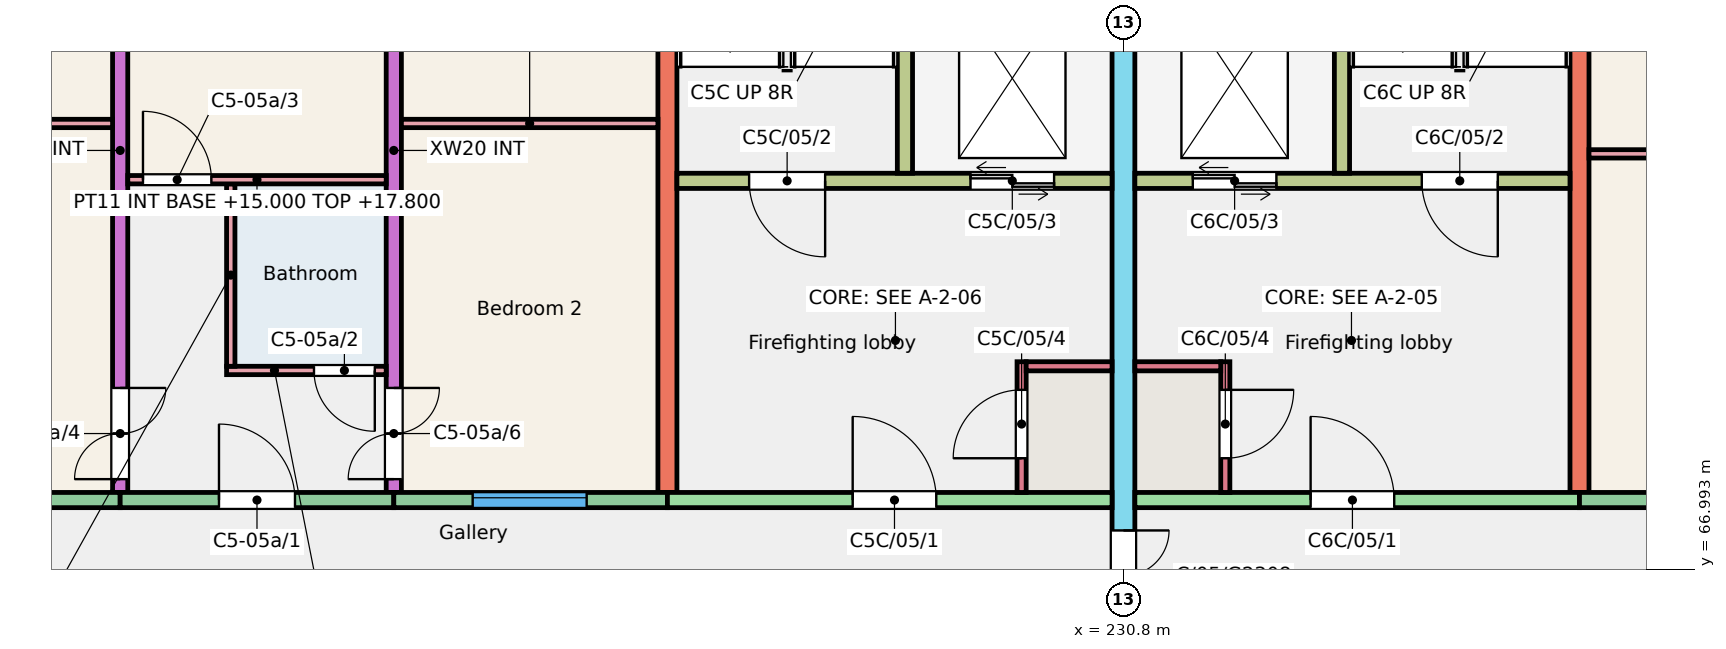
"""IFC4 building model, lengths in metres.
Left out: names, types, materials, properties, quantities, classifications, styles, units other than length and angle.
Written with IfcOpenShell. Run it as: python <this file> out.ifc"""

import sys

from ifc_helpers import new_model, si_unit, direction, frame, frame_2d, origin, place, context, subcontext, project, spatial, rectangle, extrude, element, fill, save


model = new_model("IFC4")
c1 = context("Model", 3, precision=1e-05, world=origin(), true_north=direction((0.0, 1.0)))
c2 = subcontext(c1, "Body", "Model", "MODEL_VIEW")
j1 = project(units=[si_unit("LENGTHUNIT", "METRE"), si_unit("PLANEANGLEUNIT", "RADIAN")], contexts=[c1])
p1 = place(None, origin())
s1 = spatial("IfcSite", under=j1, at=p1, CompositionType="ELEMENT")
p2 = place(p1, origin())
s2 = spatial("IfcBuilding", under=s1, at=p2, CompositionType="ELEMENT")
p3 = place(p2, frame((0.0, 0.0, 15.0)))
s3 = spatial("IfcBuildingStorey", under=s2, at=p3, CompositionType="ELEMENT", Elevation=15.0)
p4 = place(p3, frame((217.6, 68.0, 0.0), z_axis=(0.0, 0.0, 1.0), x_axis=(0.0, 1.0, 0.0)))
e1 = element("IfcWall", 1, at=p4, inside=s3, PredefinedType="SHEAR", context=c2, shape_type="SweptSolid", body=[
    extrude(rectangle(XDim=9.0, YDim=0.2, at=frame_2d((4.5, 0.0))), origin(), (0.0, 0.0, 1.0), 3.0),
])
p5 = place(p4, frame((0.175, 0.0, 0.0)))
e2 = element("IfcOpeningElement", 2, at=p5, cuts=e1, PredefinedType="OPENING", context=c2, shape_type="SweptSolid", body=[
    extrude(rectangle(XDim=1.2, YDim=2.1, at=frame_2d((0.6, 1.05))), frame((0.0, 0.11, 0.0), z_axis=(0.0, -1.0, 0.0), x_axis=(1.0, 0.0, 0.0)), (0.0, 0.0, 1.0), 0.22),
])
p6 = place(p4, frame((6.4, 0.0, 0.0)))
e3 = element("IfcOpeningElement", 3, at=p6, cuts=e1, PredefinedType="OPENING", context=c2, shape_type="SweptSolid", body=[
    extrude(rectangle(XDim=1.2, YDim=2.1, at=frame_2d((0.6, 1.05))), frame((0.0, 0.11, 0.0), z_axis=(0.0, -1.0, 0.0), x_axis=(1.0, 0.0, 0.0)), (0.0, 0.0, 1.0), 0.22),
])
p7 = place(p3, frame((221.2, 68.0, 0.0), z_axis=(0.0, 0.0, 1.0), x_axis=(0.0, 1.0, 0.0)))
e4 = element("IfcWall", 4, at=p7, inside=s3, PredefinedType="SHEAR", context=c2, shape_type="SweptSolid", body=[
    extrude(rectangle(XDim=9.0, YDim=0.2, at=frame_2d((4.5, 0.0))), origin(), (0.0, 0.0, 1.0), 3.0),
])
p8 = place(p7, frame((0.175, 0.0, 0.0)))
e5 = element("IfcOpeningElement", 5, at=p8, cuts=e4, PredefinedType="OPENING", context=c2, shape_type="SweptSolid", body=[
    extrude(rectangle(XDim=1.2, YDim=2.1, at=frame_2d((0.6, 1.05))), frame((0.0, 0.11, 0.0), z_axis=(0.0, -1.0, 0.0), x_axis=(1.0, 0.0, 0.0)), (0.0, 0.0, 1.0), 0.22),
])
p9 = place(p7, frame((6.4, 0.0, 0.0)))
e6 = element("IfcOpeningElement", 6, at=p9, cuts=e4, PredefinedType="OPENING", context=c2, shape_type="SweptSolid", body=[
    extrude(rectangle(XDim=1.2, YDim=2.1, at=frame_2d((0.6, 1.05))), frame((0.0, 0.11, 0.0), z_axis=(0.0, -1.0, 0.0), x_axis=(1.0, 0.0, 0.0)), (0.0, 0.0, 1.0), 0.22),
])
p10 = place(p3, frame((224.8, 68.0, 0.0), z_axis=(0.0, 0.0, 1.0), x_axis=(0.0, 1.0, 0.0)))
e7 = element("IfcWall", 7, at=p10, inside=s3, PredefinedType="SHEAR", context=c2, shape_type="SweptSolid", body=[
    extrude(rectangle(XDim=9.0, YDim=0.25, at=frame_2d((4.5, 0.0))), origin(), (0.0, 0.0, 1.0), 3.0),
])
p11 = place(p3, frame((230.8, 66.0, 0.0), z_axis=(0.0, 0.0, 1.0), x_axis=(0.0, 1.0, 0.0)))
e8 = element("IfcWall", 8, at=p11, inside=s3, PredefinedType="SHEAR", context=c2, shape_type="SweptSolid", body=[
    extrude(rectangle(XDim=11.0, YDim=0.3, at=frame_2d((5.5, 0.0))), origin(), (0.0, 0.0, 1.0), 3.0),
])
p12 = place(p11, frame((0.3, 0.0, 0.0)))
e9 = element("IfcOpeningElement", 9, at=p12, cuts=e8, PredefinedType="OPENING", context=c2, shape_type="SweptSolid", body=[
    extrude(rectangle(XDim=1.2, YDim=2.1, at=frame_2d((0.6, 1.05))), frame((0.0, 0.16, 0.0), z_axis=(0.0, -1.0, 0.0), x_axis=(1.0, 0.0, 0.0)), (0.0, 0.0, 1.0), 0.32),
])
p13 = place(p3, frame((236.8, 68.0, 0.0), z_axis=(0.0, 0.0, 1.0), x_axis=(0.0, 1.0, 0.0)))
e10 = element("IfcWall", 10, at=p13, inside=s3, PredefinedType="SHEAR", context=c2, shape_type="SweptSolid", body=[
    extrude(rectangle(XDim=9.0, YDim=0.25, at=frame_2d((4.5, 0.0))), origin(), (0.0, 0.0, 1.0), 3.0),
])
p14 = place(p3, frame((214.15, 67.9, 0.0), z_axis=(0.0, 0.0, 1.0), x_axis=(1.0, 0.0, 0.0)))
e11 = element("IfcWall", 11, at=p14, inside=s3, PredefinedType="SOLIDWALL", context=c2, shape_type="SweptSolid", body=[
    extrude(rectangle(XDim=3.45, YDim=0.2, at=frame_2d((1.725, 0.0))), origin(), (0.0, 0.0, 1.0), 3.0),
])
p15 = place(p14, frame((0.925, 0.0, 0.9)))
e12 = element("IfcOpeningElement", 12, at=p15, cuts=e11, PredefinedType="OPENING", context=c2, shape_type="SweptSolid", body=[
    extrude(rectangle(XDim=1.5, YDim=1.5, at=frame_2d((0.75, 0.75))), frame((0.0, 0.11, 0.0), z_axis=(0.0, -1.0, 0.0), x_axis=(1.0, 0.0, 0.0)), (0.0, 0.0, 1.0), 0.22),
])
p16 = place(p3, frame((217.6, 67.9, 0.0), z_axis=(0.0, 0.0, 1.0), x_axis=(1.0, 0.0, 0.0)))
e13 = element("IfcWall", 13, at=p16, inside=s3, PredefinedType="SOLIDWALL", context=c2, shape_type="SweptSolid", body=[
    extrude(rectangle(XDim=3.6, YDim=0.2, at=frame_2d((1.8, 0.0))), origin(), (0.0, 0.0, 1.0), 3.0),
])
p17 = place(p16, frame((1.3, 0.0, 0.0)))
e14 = element("IfcOpeningElement", 14, at=p17, cuts=e13, PredefinedType="OPENING", context=c2, shape_type="SweptSolid", body=[
    extrude(rectangle(XDim=1.0, YDim=2.1, at=frame_2d((0.5, 1.05))), frame((0.0, 0.11, 0.0), z_axis=(0.0, -1.0, 0.0), x_axis=(1.0, 0.0, 0.0)), (0.0, 0.0, 1.0), 0.22),
])
p18 = place(p3, frame((221.2, 67.9, 0.0), z_axis=(0.0, 0.0, 1.0), x_axis=(1.0, 0.0, 0.0)))
e15 = element("IfcWall", 15, at=p18, inside=s3, PredefinedType="SOLIDWALL", context=c2, shape_type="SweptSolid", body=[
    extrude(rectangle(XDim=3.6, YDim=0.2, at=frame_2d((1.8, 0.0))), origin(), (0.0, 0.0, 1.0), 3.0),
])
p19 = place(p18, frame((1.038, 0.0, 0.9)))
e16 = element("IfcOpeningElement", 16, at=p19, cuts=e15, PredefinedType="OPENING", context=c2, shape_type="SweptSolid", body=[
    extrude(rectangle(XDim=1.5, YDim=1.5, at=frame_2d((0.75, 0.75))), frame((0.0, 0.11, 0.0), z_axis=(0.0, -1.0, 0.0), x_axis=(1.0, 0.0, 0.0)), (0.0, 0.0, 1.0), 0.22),
])
p20 = place(p3, frame((224.8, 67.9, 0.0), z_axis=(0.0, 0.0, 1.0), x_axis=(1.0, 0.0, 0.0)))
e17 = element("IfcWall", 17, at=p20, inside=s3, PredefinedType="SHEAR", context=c2, shape_type="SweptSolid", body=[
    extrude(rectangle(XDim=5.85, YDim=0.2, at=frame_2d((2.925, 0.0))), origin(), (0.0, 0.0, 1.0), 3.0),
])
p21 = place(p20, frame((2.438, 0.0, 0.0)))
e18 = element("IfcOpeningElement", 18, at=p21, cuts=e17, PredefinedType="OPENING", context=c2, shape_type="SweptSolid", body=[
    extrude(rectangle(XDim=1.1, YDim=2.1, at=frame_2d((0.55, 1.05))), frame((0.0, 0.11, 0.0), z_axis=(0.0, -1.0, 0.0), x_axis=(1.0, 0.0, 0.0)), (0.0, 0.0, 1.0), 0.22),
])
p22 = place(p3, frame((224.925, 72.1, 0.0), z_axis=(0.0, 0.0, 1.0), x_axis=(1.0, 0.0, 0.0)))
e19 = element("IfcWall", 19, at=p22, inside=s3, PredefinedType="SHEAR", context=c2, shape_type="SweptSolid", body=[
    extrude(rectangle(XDim=5.725, YDim=0.2, at=frame_2d((2.862, 0.0))), origin(), (0.0, 0.0, 1.0), 3.0),
])
p23 = place(p22, frame((0.95, 0.0, 0.0)))
e20 = element("IfcOpeningElement", 20, at=p23, cuts=e19, PredefinedType="OPENING", context=c2, shape_type="SweptSolid", body=[
    extrude(rectangle(XDim=1.0, YDim=2.1, at=frame_2d((0.5, 1.05))), frame((0.0, 0.11, 0.0), z_axis=(0.0, -1.0, 0.0), x_axis=(1.0, 0.0, 0.0)), (0.0, 0.0, 1.0), 0.22),
])
p24 = place(p22, frame((3.863, 0.0, 0.0)))
e21 = element("IfcOpeningElement", 21, at=p24, cuts=e19, PredefinedType="OPENING", context=c2, shape_type="SweptSolid", body=[
    extrude(rectangle(XDim=1.1, YDim=2.1, at=frame_2d((0.55, 1.05))), frame((0.0, 0.11, 0.0), z_axis=(0.0, -1.0, 0.0), x_axis=(1.0, 0.0, 0.0)), (0.0, 0.0, 1.0), 0.22),
])
p25 = place(p3, frame((227.925, 72.2, 0.0), z_axis=(0.0, 0.0, 1.0), x_axis=(0.0, 1.0, 0.0)))
e22 = element("IfcWall", 22, at=p25, inside=s3, PredefinedType="SHEAR", context=c2, shape_type="SweptSolid", body=[
    extrude(rectangle(XDim=4.8, YDim=0.2, at=frame_2d((2.4, 0.0))), origin(), (0.0, 0.0, 1.0), 3.0),
])
p26 = place(p3, frame((229.46, 68.0, 0.0), z_axis=(0.0, 0.0, 1.0), x_axis=(0.0, 1.0, 0.0)))
e23 = element("IfcWall", 23, at=p26, inside=s3, PredefinedType="SHEAR", context=c2, shape_type="SweptSolid", body=[
    extrude(rectangle(XDim=1.72, YDim=0.12, at=frame_2d((0.86, 0.0))), origin(), (0.0, 0.0, 1.0), 3.0),
])
p27 = place(p26, frame((0.45, 0.0, 0.0)))
e24 = element("IfcOpeningElement", 24, at=p27, cuts=e23, PredefinedType="OPENING", context=c2, shape_type="SweptSolid", body=[
    extrude(rectangle(XDim=0.9, YDim=2.1, at=frame_2d((0.45, 1.05))), frame((0.0, 0.07, 0.0), z_axis=(0.0, -1.0, 0.0), x_axis=(1.0, 0.0, 0.0)), (0.0, 0.0, 1.0), 0.14),
])
p28 = place(p3, frame((229.52, 69.66, 0.0), z_axis=(0.0, 0.0, 1.0), x_axis=(1.0, 0.0, 0.0)))
e25 = element("IfcWall", 25, at=p28, inside=s3, PredefinedType="SHEAR", context=c2, shape_type="SweptSolid", body=[
    extrude(rectangle(XDim=1.13, YDim=0.12, at=frame_2d((0.565, 0.0))), origin(), (0.0, 0.0, 1.0), 3.0),
])
p29 = place(p3, frame((230.95, 67.9, 0.0), z_axis=(0.0, 0.0, 1.0), x_axis=(1.0, 0.0, 0.0)))
e26 = element("IfcWall", 26, at=p29, inside=s3, PredefinedType="SHEAR", context=c2, shape_type="SweptSolid", body=[
    extrude(rectangle(XDim=5.85, YDim=0.2, at=frame_2d((2.925, 0.0))), origin(), (0.0, 0.0, 1.0), 3.0),
])
p30 = place(p29, frame((2.312, 0.0, 0.0)))
e27 = element("IfcOpeningElement", 27, at=p30, cuts=e26, PredefinedType="OPENING", context=c2, shape_type="SweptSolid", body=[
    extrude(rectangle(XDim=1.1, YDim=2.1, at=frame_2d((0.55, 1.05))), frame((0.0, 0.11, 0.0), z_axis=(0.0, -1.0, 0.0), x_axis=(1.0, 0.0, 0.0)), (0.0, 0.0, 1.0), 0.22),
])
p31 = place(p3, frame((230.95, 72.1, 0.0), z_axis=(0.0, 0.0, 1.0), x_axis=(1.0, 0.0, 0.0)))
e28 = element("IfcWall", 28, at=p31, inside=s3, PredefinedType="SHEAR", context=c2, shape_type="SweptSolid", body=[
    extrude(rectangle(XDim=5.725, YDim=0.2, at=frame_2d((2.863, 0.0))), origin(), (0.0, 0.0, 1.0), 3.0),
])
p32 = place(p31, frame((3.775, 0.0, 0.0)))
e29 = element("IfcOpeningElement", 29, at=p32, cuts=e28, PredefinedType="OPENING", context=c2, shape_type="SweptSolid", body=[
    extrude(rectangle(XDim=1.0, YDim=2.1, at=frame_2d((0.5, 1.05))), frame((0.0, 0.11, 0.0), z_axis=(0.0, -1.0, 0.0), x_axis=(1.0, 0.0, 0.0)), (0.0, 0.0, 1.0), 0.22),
])
p33 = place(p31, frame((0.762, 0.0, 0.0)))
e30 = element("IfcOpeningElement", 30, at=p33, cuts=e28, PredefinedType="OPENING", context=c2, shape_type="SweptSolid", body=[
    extrude(rectangle(XDim=1.1, YDim=2.1, at=frame_2d((0.55, 1.05))), frame((0.0, 0.11, 0.0), z_axis=(0.0, -1.0, 0.0), x_axis=(1.0, 0.0, 0.0)), (0.0, 0.0, 1.0), 0.22),
])
p34 = place(p3, frame((233.675, 72.2, 0.0), z_axis=(0.0, 0.0, 1.0), x_axis=(0.0, 1.0, 0.0)))
e31 = element("IfcWall", 31, at=p34, inside=s3, PredefinedType="SHEAR", context=c2, shape_type="SweptSolid", body=[
    extrude(rectangle(XDim=4.8, YDim=0.2, at=frame_2d((2.4, 0.0))), origin(), (0.0, 0.0, 1.0), 3.0),
])
p35 = place(p3, frame((232.14, 68.0, 0.0), z_axis=(0.0, 0.0, 1.0), x_axis=(0.0, 1.0, 0.0)))
e32 = element("IfcWall", 32, at=p35, inside=s3, PredefinedType="SHEAR", context=c2, shape_type="SweptSolid", body=[
    extrude(rectangle(XDim=1.72, YDim=0.12, at=frame_2d((0.86, 0.0))), origin(), (0.0, 0.0, 1.0), 3.0),
])
p36 = place(p35, frame((0.45, 0.0, 0.0)))
e33 = element("IfcOpeningElement", 33, at=p36, cuts=e32, PredefinedType="OPENING", context=c2, shape_type="SweptSolid", body=[
    extrude(rectangle(XDim=0.9, YDim=2.1, at=frame_2d((0.45, 1.05))), frame((0.0, 0.07, 0.0), z_axis=(0.0, -1.0, 0.0), x_axis=(1.0, 0.0, 0.0)), (0.0, 0.0, 1.0), 0.14),
])
p37 = place(p3, frame((230.95, 69.66, 0.0), z_axis=(0.0, 0.0, 1.0), x_axis=(1.0, 0.0, 0.0)))
e34 = element("IfcWall", 34, at=p37, inside=s3, PredefinedType="SHEAR", context=c2, shape_type="SweptSolid", body=[
    extrude(rectangle(XDim=1.13, YDim=0.12, at=frame_2d((0.565, 0.0))), origin(), (0.0, 0.0, 1.0), 3.0),
])
p38 = place(p3, frame((236.8, 67.9, 0.0), z_axis=(0.0, 0.0, 1.0), x_axis=(1.0, 0.0, 0.0)))
e35 = element("IfcWall", 35, at=p38, inside=s3, PredefinedType="SOLIDWALL", context=c2, shape_type="SweptSolid", body=[
    extrude(rectangle(XDim=3.6, YDim=0.2, at=frame_2d((1.8, 0.0))), origin(), (0.0, 0.0, 1.0), 3.0),
])
p39 = place(p38, frame((1.062, 0.0, 0.9)))
e36 = element("IfcOpeningElement", 36, at=p39, cuts=e35, PredefinedType="OPENING", context=c2, shape_type="SweptSolid", body=[
    extrude(rectangle(XDim=1.5, YDim=1.5, at=frame_2d((0.75, 0.75))), frame((0.0, 0.11, 0.0), z_axis=(0.0, -1.0, 0.0), x_axis=(1.0, 0.0, 0.0)), (0.0, 0.0, 1.0), 0.22),
])
p40 = place(p3, frame((219.0, 69.605, 0.0), z_axis=(0.0, 0.0, 1.0), x_axis=(1.0, 0.0, 0.0)))
e37 = element("IfcWall", 37, at=p40, inside=s3, PredefinedType="PARTITIONING", context=c2, shape_type="SweptSolid", body=[
    extrude(rectangle(XDim=2.1, YDim=0.11, at=frame_2d((1.05, 0.0))), origin(), (0.0, 0.0, 1.0), 2.8),
])
p41 = place(p40, frame((1.15, 0.0, 0.0)))
e38 = element("IfcOpeningElement", 38, at=p41, cuts=e37, PredefinedType="OPENING", context=c2, shape_type="SweptSolid", body=[
    extrude(rectangle(XDim=0.8, YDim=2.1, at=frame_2d((0.4, 1.05))), frame((0.0, 0.065, 0.0), z_axis=(0.0, -1.0, 0.0), x_axis=(1.0, 0.0, 0.0)), (0.0, 0.0, 1.0), 0.13),
])
p42 = place(p3, frame((219.055, 69.66, 0.0), z_axis=(0.0, 0.0, 1.0), x_axis=(0.0, 1.0, 0.0)))
e39 = element("IfcWall", 39, at=p42, inside=s3, PredefinedType="PARTITIONING", context=c2, shape_type="SweptSolid", body=[
    extrude(rectangle(XDim=2.4, YDim=0.11, at=frame_2d((1.2, 0.0))), origin(), (0.0, 0.0, 1.0), 2.8),
])
p43 = place(p3, frame((217.7, 72.115, 0.0), z_axis=(0.0, 0.0, 1.0), x_axis=(1.0, 0.0, 0.0)))
e40 = element("IfcWall", 40, at=p43, inside=s3, PredefinedType="PARTITIONING", context=c2, shape_type="SweptSolid", body=[
    extrude(rectangle(XDim=3.4, YDim=0.11, at=frame_2d((1.7, 0.0))), origin(), (0.0, 0.0, 1.0), 2.8),
])
p44 = place(p43, frame((0.2, 0.0, 0.0)))
e41 = element("IfcOpeningElement", 41, at=p44, cuts=e40, PredefinedType="OPENING", context=c2, shape_type="SweptSolid", body=[
    extrude(rectangle(XDim=0.9, YDim=2.1, at=frame_2d((0.45, 1.05))), frame((0.0, 0.065, 0.0), z_axis=(0.0, -1.0, 0.0), x_axis=(1.0, 0.0, 0.0)), (0.0, 0.0, 1.0), 0.13),
])
p45 = place(p3, frame((214.15, 72.855, 0.0), z_axis=(0.0, 0.0, 1.0), x_axis=(1.0, 0.0, 0.0)))
e42 = element("IfcWall", 42, at=p45, inside=s3, PredefinedType="PARTITIONING", context=c2, shape_type="SweptSolid", body=[
    extrude(rectangle(XDim=3.35, YDim=0.11, at=frame_2d((1.675, 0.0))), origin(), (0.0, 0.0, 1.0), 2.8),
])
for number, where, z_axis, x_axis in (
    (43, (221.3, 72.855, 0.0), (0.0, 0.0, 1.0), (1.0, 0.0, 0.0)),
    (44, (236.925, 72.455, 0.0), (0.0, 0.0, 1.0), (1.0, 0.0, 0.0)),
):
    element("IfcWall", number, at=place(p3, frame(where, z_axis=z_axis, x_axis=x_axis)), inside=s3, PredefinedType="PARTITIONING", context=c2, shape_type="SweptSolid", body=[
        extrude(rectangle(XDim=3.375, YDim=0.11, at=frame_2d((1.688, 0.0))), origin(), (0.0, 0.0, 1.0), 2.8),
    ])
p46 = place(p19, origin())
e45 = element("IfcWindow", 45, at=p46, inside=s3, PartitioningType="SINGLE_PANEL", PredefinedType="WINDOW", context=c2, shape_type="SweptSolid", body=[
    extrude(rectangle(XDim=1.5, YDim=1.5, at=frame_2d((0.75, 0.75))), frame((0.0, 0.06, 0.0), z_axis=(0.0, -1.0, 0.0), x_axis=(1.0, 0.0, 0.0)), (0.0, 0.0, 1.0), 0.06),
])
fill(e16, e45)
p47 = place(p17, origin())
e46 = element("IfcDoor", 46, at=p47, inside=s3, OperationType="SINGLE_SWING_LEFT", PredefinedType="DOOR", context=c2, shape_type="SweptSolid", body=[
    extrude(rectangle(XDim=1.0, YDim=2.1, at=frame_2d((0.5, 1.05))), frame((0.0, 0.025, 0.0), z_axis=(0.0, -1.0, 0.0), x_axis=(1.0, 0.0, 0.0)), (0.0, 0.0, 1.0), 0.05),
])
fill(e14, e46)
p48 = place(p41, origin())
e47 = element("IfcDoor", 47, at=p48, inside=s3, OperationType="SINGLE_SWING_RIGHT", PredefinedType="DOOR", context=c2, shape_type="SweptSolid", body=[
    extrude(rectangle(XDim=0.8, YDim=2.1, at=frame_2d((0.4, 1.05))), frame((0.0, 0.025, 0.0), z_axis=(0.0, -1.0, 0.0), x_axis=(1.0, 0.0, 0.0)), (0.0, 0.0, 1.0), 0.05),
])
fill(e38, e47)
p49 = place(p44, origin())
e48 = element("IfcDoor", 48, at=p49, inside=s3, OperationType="SINGLE_SWING_LEFT", PredefinedType="DOOR", context=c2, shape_type="SweptSolid", body=[
    extrude(rectangle(XDim=0.9, YDim=2.1, at=frame_2d((0.45, 1.05))), frame((0.0, 0.025, 0.0), z_axis=(0.0, -1.0, 0.0), x_axis=(1.0, 0.0, 0.0)), (0.0, 0.0, 1.0), 0.05),
])
fill(e41, e48)
p50 = place(p5, origin())
e49 = element("IfcDoor", 49, at=p50, inside=s3, OperationType="DOUBLE_DOOR_SINGLE_SWING", PredefinedType="DOOR", context=c2, shape_type="SweptSolid", body=[
    extrude(rectangle(XDim=1.2, YDim=2.1, at=frame_2d((0.6, 1.05))), frame((0.0, 0.025, 0.0), z_axis=(0.0, -1.0, 0.0), x_axis=(1.0, 0.0, 0.0)), (0.0, 0.0, 1.0), 0.05),
])
fill(e2, e49)
p51 = place(p8, origin())
e50 = element("IfcDoor", 50, at=p51, inside=s3, OperationType="DOUBLE_DOOR_SINGLE_SWING", PredefinedType="DOOR", context=c2, shape_type="SweptSolid", body=[
    extrude(rectangle(XDim=1.2, YDim=2.1, at=frame_2d((0.6, 1.05))), frame((0.0, 0.025, 0.0), z_axis=(0.0, -1.0, 0.0), x_axis=(1.0, 0.0, 0.0)), (0.0, 0.0, 1.0), 0.05),
])
fill(e5, e50)
p52 = place(p21, origin())
e51 = element("IfcDoor", 51, at=p52, inside=s3, OperationType="SINGLE_SWING_LEFT", PredefinedType="DOOR", context=c2, shape_type="SweptSolid", body=[
    extrude(rectangle(XDim=1.1, YDim=2.1, at=frame_2d((0.55, 1.05))), frame((0.0, 0.025, 0.0), z_axis=(0.0, -1.0, 0.0), x_axis=(1.0, 0.0, 0.0)), (0.0, 0.0, 1.0), 0.05),
])
fill(e18, e51)
p53 = place(p23, origin())
e52 = element("IfcDoor", 52, at=p53, inside=s3, OperationType="SINGLE_SWING_RIGHT", PredefinedType="DOOR", context=c2, shape_type="SweptSolid", body=[
    extrude(rectangle(XDim=1.0, YDim=2.1, at=frame_2d((0.5, 1.05))), frame((0.0, 0.025, 0.0), z_axis=(0.0, -1.0, 0.0), x_axis=(1.0, 0.0, 0.0)), (0.0, 0.0, 1.0), 0.05),
])
fill(e20, e52)
p54 = place(p24, origin())
e53 = element("IfcDoor", 53, at=p54, inside=s3, OperationType="DOUBLE_DOOR_SLIDING", PredefinedType="DOOR", context=c2, shape_type="SweptSolid", body=[
    extrude(rectangle(XDim=1.1, YDim=2.1, at=frame_2d((0.55, 1.05))), frame((0.0, 0.025, 0.0), z_axis=(0.0, -1.0, 0.0), x_axis=(1.0, 0.0, 0.0)), (0.0, 0.0, 1.0), 0.05),
])
fill(e21, e53)
p55 = place(p27, origin())
e54 = element("IfcDoor", 54, at=p55, inside=s3, OperationType="SINGLE_SWING_LEFT", PredefinedType="DOOR", context=c2, shape_type="SweptSolid", body=[
    extrude(rectangle(XDim=0.9, YDim=2.1, at=frame_2d((0.45, 1.05))), frame((0.0, 0.025, 0.0), z_axis=(0.0, -1.0, 0.0), x_axis=(1.0, 0.0, 0.0)), (0.0, 0.0, 1.0), 0.05),
])
fill(e24, e54)
p56 = place(p30, origin())
e55 = element("IfcDoor", 55, at=p56, inside=s3, OperationType="SINGLE_SWING_LEFT", PredefinedType="DOOR", context=c2, shape_type="SweptSolid", body=[
    extrude(rectangle(XDim=1.1, YDim=2.1, at=frame_2d((0.55, 1.05))), frame((0.0, 0.025, 0.0), z_axis=(0.0, -1.0, 0.0), x_axis=(1.0, 0.0, 0.0)), (0.0, 0.0, 1.0), 0.05),
])
fill(e27, e55)
p57 = place(p32, origin())
e56 = element("IfcDoor", 56, at=p57, inside=s3, OperationType="SINGLE_SWING_RIGHT", PredefinedType="DOOR", context=c2, shape_type="SweptSolid", body=[
    extrude(rectangle(XDim=1.0, YDim=2.1, at=frame_2d((0.5, 1.05))), frame((0.0, 0.025, 0.0), z_axis=(0.0, -1.0, 0.0), x_axis=(1.0, 0.0, 0.0)), (0.0, 0.0, 1.0), 0.05),
])
fill(e29, e56)
p58 = place(p33, origin())
e57 = element("IfcDoor", 57, at=p58, inside=s3, OperationType="DOUBLE_DOOR_SLIDING", PredefinedType="DOOR", context=c2, shape_type="SweptSolid", body=[
    extrude(rectangle(XDim=1.1, YDim=2.1, at=frame_2d((0.55, 1.05))), frame((0.0, 0.025, 0.0), z_axis=(0.0, -1.0, 0.0), x_axis=(1.0, 0.0, 0.0)), (0.0, 0.0, 1.0), 0.05),
])
fill(e30, e57)
p59 = place(p36, origin())
e58 = element("IfcDoor", 58, at=p59, inside=s3, OperationType="SINGLE_SWING_RIGHT", PredefinedType="DOOR", context=c2, shape_type="SweptSolid", body=[
    extrude(rectangle(XDim=0.9, YDim=2.1, at=frame_2d((0.45, 1.05))), frame((0.0, 0.025, 0.0), z_axis=(0.0, -1.0, 0.0), x_axis=(1.0, 0.0, 0.0)), (0.0, 0.0, 1.0), 0.05),
])
fill(e33, e58)
p60 = place(p12, origin())
e59 = element("IfcDoor", 59, at=p60, inside=s3, OperationType="DOUBLE_DOOR_SINGLE_SWING", PredefinedType="DOOR", context=c2, shape_type="SweptSolid", body=[
    extrude(rectangle(XDim=1.2, YDim=2.1, at=frame_2d((0.6, 1.05))), frame((0.0, 0.025, 0.0), z_axis=(0.0, -1.0, 0.0), x_axis=(1.0, 0.0, 0.0)), (0.0, 0.0, 1.0), 0.05),
])
fill(e9, e59)
save(model, sys.argv[1])
